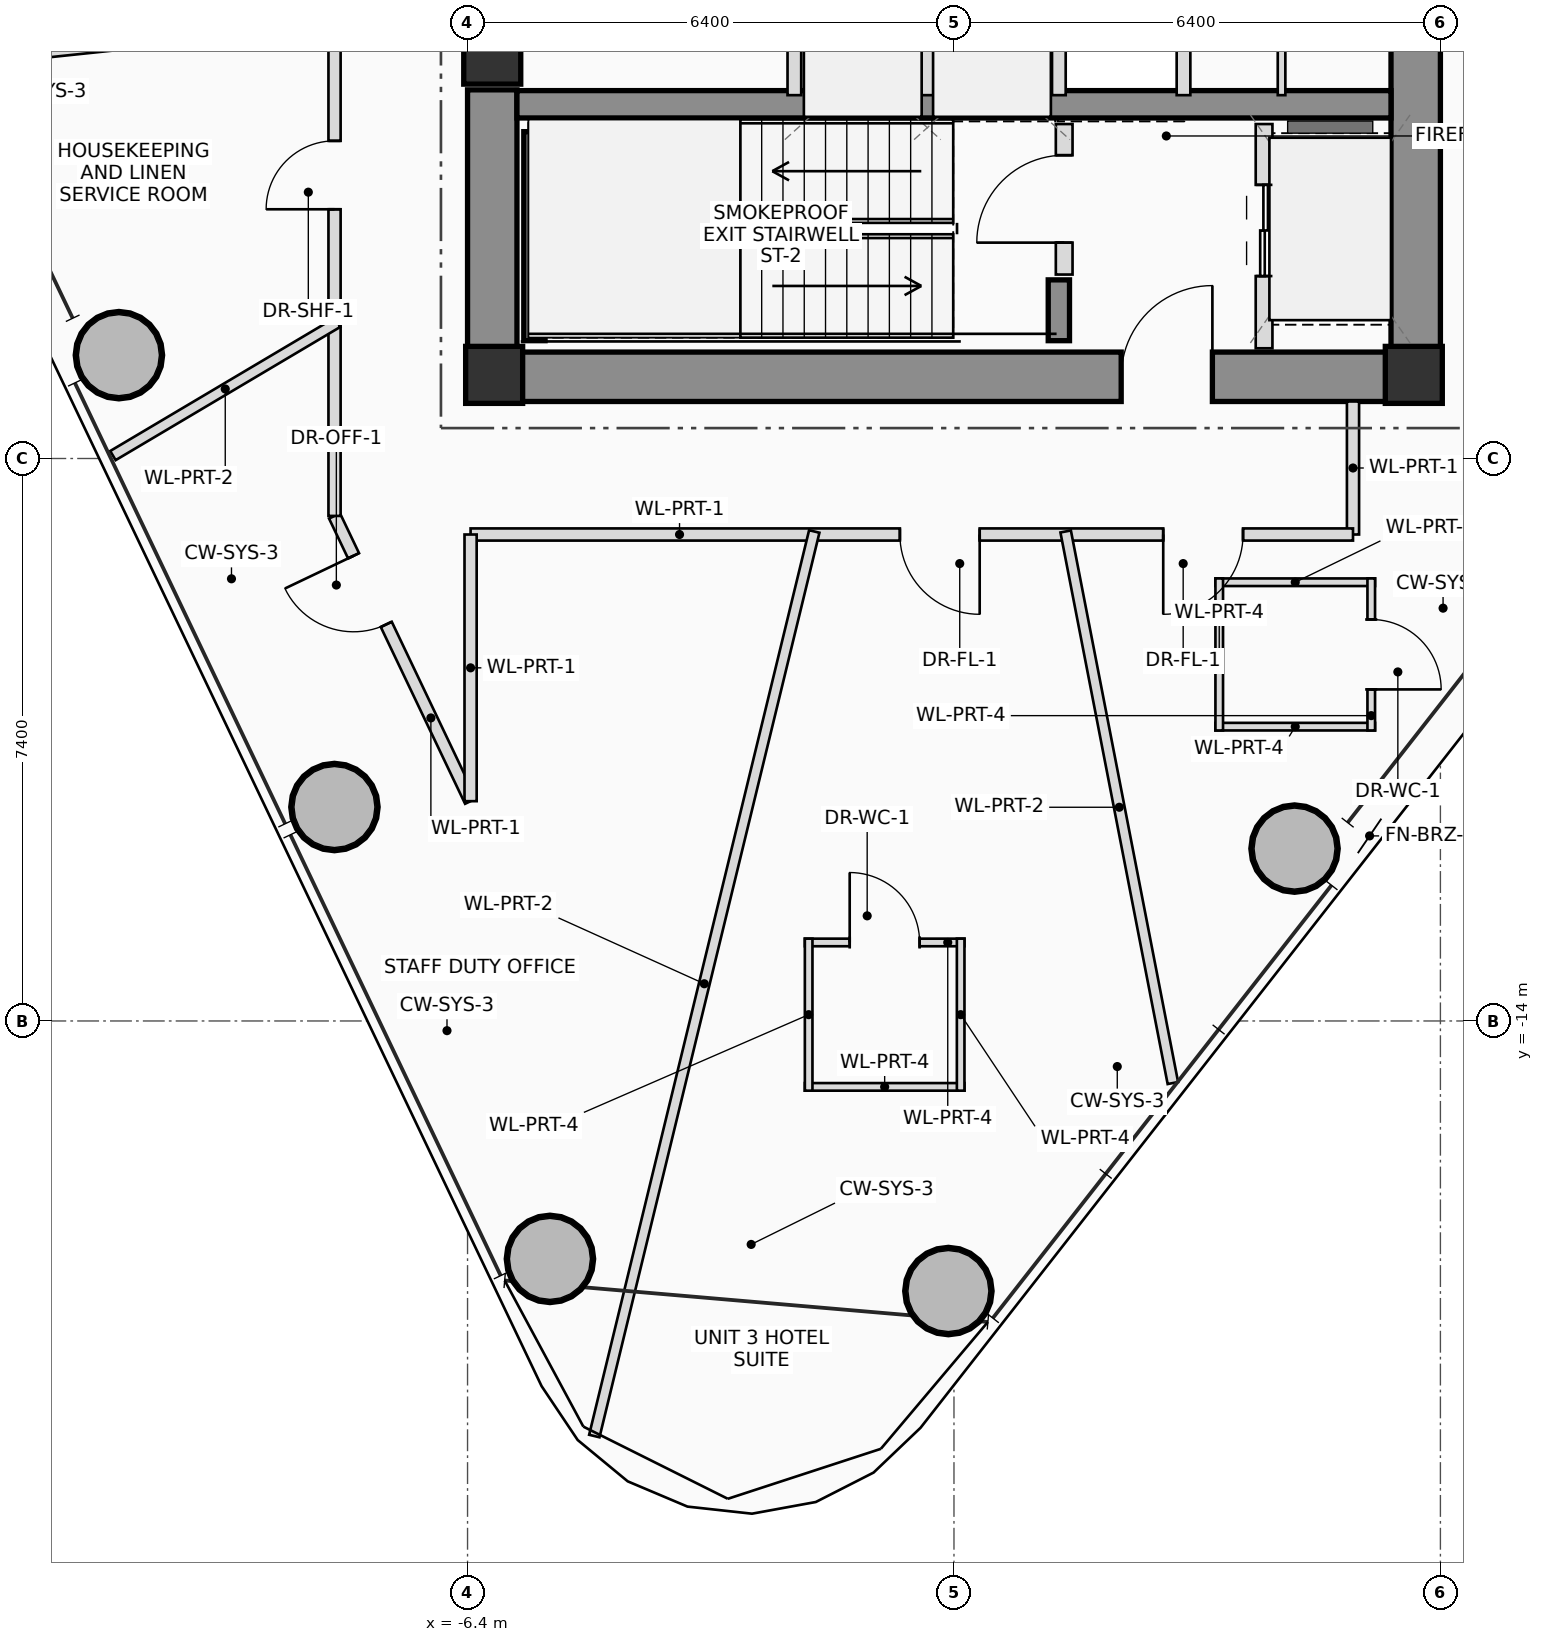
"""IFC4 building model, lengths in metres.
Left out: names, types, materials, properties, quantities, classifications, styles, units other than length and angle.
Written with IfcOpenShell. Run it as: python <this file> out.ifc"""

import sys

from ifc_helpers import new_model, si_unit, direction, frame, frame_2d, origin, origin_2d, place, context, subcontext, project, spatial, rectangle, hollow_circle, extrude, source, transform, mapped, element, fill, save


model = new_model("IFC4")
c1 = context("Model", 3, precision=1e-05, world=origin(), true_north=direction((0.0, 1.0)))
c2 = subcontext(c1, "Body", "Model", "MODEL_VIEW")
j1 = project(units=[si_unit("LENGTHUNIT", "METRE"), si_unit("PLANEANGLEUNIT", "RADIAN")], contexts=[c1])
p1 = place(None, origin())
s1 = spatial("IfcSite", under=j1, at=p1, CompositionType="ELEMENT")
p2 = place(p1, origin())
s2 = spatial("IfcBuilding", under=s1, at=p2, CompositionType="ELEMENT")
p3 = place(p2, frame((0.0, 0.0, 212.15)))
s3 = spatial("IfcBuildingStorey", under=s2, at=p3, CompositionType="ELEMENT", Elevation=212.15)
m1 = source(origin(), c2, "Body", "SweptSolid", [
    extrude(rectangle(XDim=0.75, YDim=0.75, at=origin_2d()), origin(), (0.0, 0.0, 1.0), 3.45),
])
for number, where, z_axis, x_axis in (
    (1, (-6.05, -5.5, 0.0), (0.0, 0.0, 1.0), (1.0, 0.0, 0.0)),
    (2, (6.05, -5.5, 0.0), (0.0, 0.0, 1.0), (1.0, 0.0, 0.0)),
):
    element("IfcColumn", number, at=place(p3, frame(where, z_axis=z_axis, x_axis=x_axis)), inside=s3, PredefinedType="COLUMN", context=c2, shape_type="MappedRepresentation", body=[
        mapped(m1, transform((0.0, 0.0, 0.0), scale=1.0)),
    ])
p4 = place(p3, frame((-6.4, -5.525, 0.0), z_axis=(0.0, 0.0, 1.0), x_axis=(1.0, 0.0, 0.0)))
e3 = element("IfcWall", 3, at=p4, inside=s3, PredefinedType="SHEAR", context=c2, shape_type="SweptSolid", body=[
    extrude(rectangle(XDim=12.8, YDim=0.65, at=frame_2d((6.4, 0.0))), origin(), (0.0, 0.0, 1.0), 3.45),
])
p5 = place(p4, frame((8.6, 0.0, 0.0)))
e4 = element("IfcOpeningElement", 4, at=p5, cuts=e3, PredefinedType="OPENING", context=c2, shape_type="SweptSolid", body=[
    extrude(rectangle(XDim=1.2, YDim=2.2, at=frame_2d((0.6, 1.1))), frame((0.0, 0.335, 0.0), z_axis=(0.0, -1.0, 0.0), x_axis=(1.0, 0.0, 0.0)), (0.0, 0.0, 1.0), 0.67),
])
p6 = place(p3, frame((6.075, -5.2, 0.0), z_axis=(0.0, 0.0, 1.0), x_axis=(0.0, 1.0, 0.0)))
e5 = element("IfcWall", 5, at=p6, inside=s3, PredefinedType="SHEAR", context=c2, shape_type="SweptSolid", body=[
    extrude(rectangle(XDim=10.4, YDim=0.65, at=frame_2d((5.2, 0.0))), origin(), (0.0, 0.0, 1.0), 3.45),
])
p7 = place(p3, frame((-6.075, -5.2, 0.0), z_axis=(0.0, 0.0, 1.0), x_axis=(0.0, 1.0, 0.0)))
e6 = element("IfcWall", 6, at=p7, inside=s3, PredefinedType="SHEAR", context=c2, shape_type="SweptSolid", body=[
    extrude(rectangle(XDim=3.45, YDim=0.65, at=frame_2d((1.725, 0.0))), origin(), (0.0, 0.0, 1.0), 3.45),
])
p8 = place(p3, frame((-5.75, -1.94, 0.0), z_axis=(0.0, 0.0, 1.0), x_axis=(1.0, 0.0, 0.0)))
e7 = element("IfcWall", 7, at=p8, inside=s3, PredefinedType="SHEAR", context=c2, shape_type="SweptSolid", body=[
    extrude(rectangle(XDim=11.5, YDim=0.36, at=frame_2d((5.75, 0.0))), origin(), (0.0, 0.0, 1.0), 3.45),
])
p9 = place(p3, frame((-5.52, -5.05, 0.0), z_axis=(0.0, 0.0, 1.0), x_axis=(0.0, 1.0, 0.0)))
e8 = element("IfcWall", 8, at=p9, inside=s3, PredefinedType="SHEAR", context=c2, shape_type="SweptSolid", body=[
    extrude(rectangle(XDim=2.75, YDim=0.28, at=frame_2d((1.375, 0.0))), origin(), (0.0, 0.0, 1.0), 3.45),
])
p10 = place(p3, frame((1.38, -5.05, 0.0), z_axis=(0.0, 0.0, 1.0), x_axis=(0.0, 1.0, 0.0)))
e9 = element("IfcWall", 9, at=p10, inside=s3, PredefinedType="SHEAR", context=c2, shape_type="SweptSolid", body=[
    extrude(rectangle(XDim=0.8, YDim=0.28, at=frame_2d((0.4, 0.0))), origin(), (0.0, 0.0, 1.0), 3.45),
])
p11 = place(p3, frame((-6.075, -1.3, 0.0), z_axis=(0.0, 0.0, 1.0), x_axis=(1.0, 0.0, 0.0)))
e10 = element("IfcColumn", 10, at=p11, inside=s3, PredefinedType="COLUMN", context=c2, shape_type="MappedRepresentation", body=[
    mapped(m1, transform((0.0, 0.0, 0.0), scale=1.0)),
])
m2 = source(origin(), c2, "Body", "SweptSolid", [
    extrude(hollow_circle(Radius=0.575, WallThickness=0.042, at=origin_2d()), origin(), (0.0, 0.0, 1.0), 3.45),
])
for number, where, z_axis, x_axis in (
    (11, (-0.073, -17.553, 0.0), (0.0, 0.0, 1.0), (1.0, 0.0, 0.0)),
    (12, (4.481, -11.732, 0.0), (0.0, 0.0, 1.0), (1.0, 0.0, 0.0)),
    (13, (-10.987, -5.24, 0.0), (0.0, 0.0, 1.0), (1.0, 0.0, 0.0)),
    (14, (-8.151, -11.185, 0.0), (0.0, 0.0, 1.0), (1.0, 0.0, 0.0)),
    (15, (-5.316, -17.13, 0.0), (0.0, 0.0, 1.0), (1.0, 0.0, 0.0)),
):
    element("IfcColumn", number, at=place(p3, frame(where, z_axis=z_axis, x_axis=x_axis)), inside=s3, PredefinedType="COLUMN", context=c2, shape_type="MappedRepresentation", body=[
        mapped(m2, transform((0.0, 0.0, 0.0), scale=1.0)),
    ])
p12 = place(p3, frame((1.45, -4.18, 0.0), z_axis=(0.0, 0.0, 1.0), x_axis=(0.0, 1.0, 0.0)))
e16 = element("IfcWall", 16, at=p12, inside=s3, PredefinedType="PLUMBINGWALL", context=c2, shape_type="SweptSolid", body=[
    extrude(rectangle(XDim=1.98, YDim=0.22, at=frame_2d((0.99, 0.0))), origin(), (0.0, 0.0, 1.0), 3.25),
])
p13 = place(p12, frame((0.42, 0.0, 0.0)))
e17 = element("IfcOpeningElement", 17, at=p13, cuts=e16, PredefinedType="OPENING", context=c2, shape_type="SweptSolid", body=[
    extrude(rectangle(XDim=1.15, YDim=2.15, at=frame_2d((0.575, 1.075))), frame((0.0, 0.12, 0.0), z_axis=(0.0, -1.0, 0.0), x_axis=(1.0, 0.0, 0.0)), (0.0, 0.0, 1.0), 0.24),
])
p14 = place(p3, frame((4.08, -5.15, 0.0), z_axis=(0.0, 0.0, 1.0), x_axis=(0.0, 1.0, 0.0)))
e18 = element("IfcWall", 18, at=p14, inside=s3, PredefinedType="PLUMBINGWALL", context=c2, shape_type="SweptSolid", body=[
    extrude(rectangle(XDim=2.95, YDim=0.22, at=frame_2d((1.475, 0.0))), origin(), (0.0, 0.0, 1.0), 3.25),
])
p15 = place(p14, frame((0.95, 0.0, 0.0)))
e19 = element("IfcOpeningElement", 19, at=p15, cuts=e18, PredefinedType="OPENING", context=c2, shape_type="SweptSolid", body=[
    extrude(rectangle(XDim=1.2, YDim=2.25, at=frame_2d((0.6, 1.125))), frame((0.0, 0.12, 0.0), z_axis=(0.0, -1.0, 0.0), x_axis=(1.0, 0.0, 0.0)), (0.0, 0.0, 1.0), 0.24),
])
for number, where, z_axis, x_axis in (
    (20, (-2.1, -1.82, 0.0), (0.0, 0.0, 1.0), (0.0, 1.0, 0.0)),
    (21, (-0.35, -1.82, 0.0), (0.0, 0.0, 1.0), (0.0, 1.0, 0.0)),
    (22, (1.38, -1.82, 0.0), (0.0, 0.0, 1.0), (0.0, 1.0, 0.0)),
    (23, (3.02, -1.82, 0.0), (0.0, 0.0, 1.0), (0.0, 1.0, 0.0)),
):
    element("IfcWall", number, at=place(p3, frame(where, z_axis=z_axis, x_axis=x_axis)), inside=s3, PredefinedType="PLUMBINGWALL", context=c2, shape_type="SweptSolid", body=[
        extrude(rectangle(XDim=0.98, YDim=0.18, at=frame_2d((0.49, 0.0))), origin(), (0.0, 0.0, 1.0), 3.25),
    ])
p16 = place(p3, frame((4.31, -1.82, 0.0), z_axis=(0.0, 0.0, 1.0), x_axis=(0.0, 1.0, 0.0)))
e24 = element("IfcWall", 24, at=p16, inside=s3, PredefinedType="PARTITIONING", context=c2, shape_type="SweptSolid", body=[
    extrude(rectangle(XDim=0.98, YDim=0.1, at=frame_2d((0.49, 0.0))), origin(), (0.0, 0.0, 1.0), 3.25),
])
p17 = place(p3, frame((-1.962, -12.967, 0.0), z_axis=(0.0, 0.0, 1.0), x_axis=(1.0, 0.0, 0.0)))
e25 = element("IfcWall", 25, at=p17, inside=s3, PredefinedType="PARTITIONING", context=c2, shape_type="SweptSolid", body=[
    extrude(rectangle(XDim=2.1, YDim=0.1, at=frame_2d((1.05, 0.0))), origin(), (0.0, 0.0, 1.0), 3.25),
])
p18 = place(p17, frame((0.59, 0.0, 0.0)))
e26 = element("IfcOpeningElement", 26, at=p18, cuts=e25, PredefinedType="OPENING", context=c2, shape_type="SweptSolid", body=[
    extrude(rectangle(XDim=0.92, YDim=2.1, at=frame_2d((0.46, 1.05))), frame((0.0, 0.06, 0.0), z_axis=(0.0, -1.0, 0.0), x_axis=(1.0, 0.0, 0.0)), (0.0, 0.0, 1.0), 0.12),
])
p19 = place(p3, frame((0.138, -14.867, 0.0), z_axis=(0.0, 0.0, 1.0), x_axis=(-1.0, 0.0, 0.0)))
e27 = element("IfcWall", 27, at=p19, inside=s3, PredefinedType="PARTITIONING", context=c2, shape_type="SweptSolid", body=[
    extrude(rectangle(XDim=2.1, YDim=0.1, at=frame_2d((1.05, 0.0))), origin(), (0.0, 0.0, 1.0), 2.605),
])
p20 = place(p3, frame((0.088, -12.917, 0.0), z_axis=(0.0, 0.0, 1.0), x_axis=(0.0, -1.0, 0.0)))
e28 = element("IfcWall", 28, at=p20, inside=s3, PredefinedType="PARTITIONING", context=c2, shape_type="SweptSolid", body=[
    extrude(rectangle(XDim=2.0, YDim=0.1, at=frame_2d((1.0, 0.0))), origin(), (0.0, 0.0, 1.0), 2.905),
])
p21 = place(p3, frame((-1.912, -14.917, 0.0), z_axis=(0.0, 0.0, 1.0), x_axis=(0.0, 1.0, 0.0)))
e29 = element("IfcWall", 29, at=p21, inside=s3, PredefinedType="PARTITIONING", context=c2, shape_type="SweptSolid", body=[
    extrude(rectangle(XDim=2.0, YDim=0.1, at=frame_2d((1.0, 0.0))), origin(), (0.0, 0.0, 1.0), 2.605),
])
for number, where, z_axis, x_axis in (
    (30, (3.44, -8.228, 0.0), (0.0, 0.0, 1.0), (1.0, 0.0, 0.0)),
    (31, (5.54, -10.128, 0.0), (0.0, 0.0, 1.0), (-1.0, 0.0, 0.0)),
):
    element("IfcWall", number, at=place(p3, frame(where, z_axis=z_axis, x_axis=x_axis)), inside=s3, PredefinedType="PARTITIONING", context=c2, shape_type="SweptSolid", body=[
        extrude(rectangle(XDim=2.1, YDim=0.1, at=frame_2d((1.05, 0.0))), origin(), (0.0, 0.0, 1.0), 2.605),
    ])
p22 = place(p3, frame((5.49, -8.178, 0.0), z_axis=(0.0, 0.0, 1.0), x_axis=(0.0, -1.0, 0.0)))
e32 = element("IfcWall", 32, at=p22, inside=s3, PredefinedType="PARTITIONING", context=c2, shape_type="SweptSolid", body=[
    extrude(rectangle(XDim=2.0, YDim=0.1, at=frame_2d((1.0, 0.0))), origin(), (0.0, 0.0, 1.0), 2.605),
])
p23 = place(p22, frame((0.54, 0.0, 0.0)))
e33 = element("IfcOpeningElement", 33, at=p23, cuts=e32, PredefinedType="OPENING", context=c2, shape_type="SweptSolid", body=[
    extrude(rectangle(XDim=0.92, YDim=2.1, at=frame_2d((0.46, 1.05))), frame((0.0, 0.06, 0.0), z_axis=(0.0, -1.0, 0.0), x_axis=(1.0, 0.0, 0.0)), (0.0, 0.0, 1.0), 0.12),
])
p24 = place(p3, frame((3.49, -10.178, 0.0), z_axis=(0.0, 0.0, 1.0), x_axis=(0.0, 1.0, 0.0)))
e34 = element("IfcWall", 34, at=p24, inside=s3, PredefinedType="PARTITIONING", context=c2, shape_type="SweptSolid", body=[
    extrude(rectangle(XDim=2.0, YDim=0.1, at=frame_2d((1.0, 0.0))), origin(), (0.0, 0.0, 1.0), 2.805),
])
p25 = place(p3, frame((-6.36, -11.108, 0.0), z_axis=(0.0, 0.0, 1.0), x_axis=(-0.430460013629, 0.902609648002, 0.0)))
e35 = element("IfcWall", 35, at=p25, inside=s3, PredefinedType="PARTITIONING", context=c2, shape_type="SweptSolid", body=[
    extrude(rectangle(XDim=4.158, YDim=0.16, at=frame_2d((2.079, 0.0))), origin(), (0.0, 0.0, 1.0), 2.605),
])
p26 = place(p25, frame((2.577, 0.0, 0.0)))
e36 = element("IfcOpeningElement", 36, at=p26, cuts=e35, PredefinedType="OPENING", context=c2, shape_type="SweptSolid", body=[
    extrude(rectangle(XDim=1.0, YDim=2.25, at=frame_2d((0.5, 1.125))), frame((0.0, 0.09, 0.0), z_axis=(0.0, -1.0, 0.0), x_axis=(1.0, 0.0, 0.0)), (0.0, 0.0, 1.0), 0.18),
])
p27 = place(p3, frame((-8.15, -7.355, 0.0), z_axis=(0.0, 0.0, 1.0), x_axis=(0.0, 1.0, 0.0)))
e37 = element("IfcWall", 37, at=p27, inside=s3, PredefinedType="PARTITIONING", context=c2, shape_type="SweptSolid", body=[
    extrude(rectangle(XDim=14.956, YDim=0.16, at=frame_2d((7.478, 0.0))), origin(), (0.0, 0.0, 1.0), 2.605),
])
p28 = place(p27, frame((4.034, 0.0, 0.0)))
e38 = element("IfcOpeningElement", 38, at=p28, cuts=e37, PredefinedType="OPENING", context=c2, shape_type="SweptSolid", body=[
    extrude(rectangle(XDim=0.9, YDim=2.05, at=frame_2d((0.45, 1.025))), frame((0.0, 0.09, 0.0), z_axis=(0.0, -1.0, 0.0), x_axis=(1.0, 0.0, 0.0)), (0.0, 0.0, 1.0), 0.18),
])
p29 = place(p27, frame((10.129, 0.0, 0.0)))
e39 = element("IfcOpeningElement", 39, at=p29, cuts=e37, PredefinedType="OPENING", context=c2, shape_type="SweptSolid", body=[
    extrude(rectangle(XDim=1.0, YDim=2.25, at=frame_2d((0.5, 1.125))), frame((0.0, 0.09, 0.0), z_axis=(0.0, -1.0, 0.0), x_axis=(1.0, 0.0, 0.0)), (0.0, 0.0, 1.0), 0.18),
])
p30 = place(p3, frame((5.25, -5.85, 0.0), z_axis=(0.0, 0.0, 1.0), x_axis=(0.0, -1.0, 0.0)))
e40 = element("IfcWall", 40, at=p30, inside=s3, PredefinedType="PARTITIONING", context=c2, shape_type="SweptSolid", body=[
    extrude(rectangle(XDim=1.75, YDim=0.16, at=frame_2d((0.875, 0.0))), origin(), (0.0, 0.0, 1.0), 3.25),
])
p31 = place(p3, frame((5.25, -7.6, 0.0), z_axis=(0.0, 0.0, 1.0), x_axis=(-1.0, 0.0, 0.0)))
e41 = element("IfcWall", 41, at=p31, inside=s3, PredefinedType="PARTITIONING", context=c2, shape_type="SweptSolid", body=[
    extrude(rectangle(XDim=11.61, YDim=0.16, at=frame_2d((5.805, 0.0))), origin(), (0.0, 0.0, 1.0), 2.605),
])
p32 = place(p31, frame((1.447, 0.0, 0.0)))
e42 = element("IfcOpeningElement", 42, at=p32, cuts=e41, PredefinedType="OPENING", context=c2, shape_type="SweptSolid", body=[
    extrude(rectangle(XDim=1.05, YDim=2.2, at=frame_2d((0.525, 1.1))), frame((0.0, 0.09, 0.0), z_axis=(0.0, -1.0, 0.0), x_axis=(1.0, 0.0, 0.0)), (0.0, 0.0, 1.0), 0.18),
])
p33 = place(p31, frame((4.912, 0.0, 0.0)))
e43 = element("IfcOpeningElement", 43, at=p33, cuts=e41, PredefinedType="OPENING", context=c2, shape_type="SweptSolid", body=[
    extrude(rectangle(XDim=1.05, YDim=2.2, at=frame_2d((0.525, 1.1))), frame((0.0, 0.09, 0.0), z_axis=(0.0, -1.0, 0.0), x_axis=(1.0, 0.0, 0.0)), (0.0, 0.0, 1.0), 0.18),
])
p34 = place(p3, frame((-6.36, -7.6, 0.0), z_axis=(0.0, 0.0, 1.0), x_axis=(0.0, -1.0, 0.0)))
e44 = element("IfcWall", 44, at=p34, inside=s3, PredefinedType="PARTITIONING", context=c2, shape_type="SweptSolid", body=[
    extrude(rectangle(XDim=3.508, YDim=0.16, at=frame_2d((1.754, 0.0))), origin(), (0.0, 0.0, 1.0), 3.25),
])
p35 = place(p3, frame((-8.11, -0.852, 0.0), z_axis=(0.0, 0.0, 1.0), x_axis=(-0.994517501458, -0.104570260086, 0.0)))
e45 = element("IfcWall", 45, at=p35, inside=s3, PredefinedType="PARTITIONING", context=c2, shape_type="SweptSolid", body=[
    extrude(rectangle(XDim=5.438, YDim=0.14, at=frame_2d((2.719, 0.0))), origin(), (0.0, 0.0, 1.0), 2.765),
])
p36 = place(p3, frame((-8.11, -4.809, 0.0), z_axis=(0.0, 0.0, 1.0), x_axis=(-0.860151862046, -0.510038012524, 0.0)))
e46 = element("IfcWall", 46, at=p36, inside=s3, PredefinedType="PARTITIONING", context=c2, shape_type="SweptSolid", body=[
    extrude(rectangle(XDim=3.436, YDim=0.14, at=frame_2d((1.718, 0.0))), origin(), (0.0, 0.0, 1.0), 2.605),
])
p37 = place(p3, frame((-1.838, -7.56, 0.0), z_axis=(0.0, 0.0, 1.0), x_axis=(-0.236259509823, -0.971689993783, 0.0)))
e47 = element("IfcWall", 47, at=p37, inside=s3, PredefinedType="PARTITIONING", context=c2, shape_type="SweptSolid", body=[
    extrude(rectangle(XDim=12.247, YDim=0.14, at=frame_2d((6.124, 0.0))), origin(), (0.0, 0.0, 1.0), 2.605),
])
p38 = place(p3, frame((1.469, -7.56, 0.0), z_axis=(0.0, 0.0, 1.0), x_axis=(0.190822808967, -0.981624498257, 0.0)))
e48 = element("IfcWall", 48, at=p38, inside=s3, PredefinedType="PARTITIONING", context=c2, shape_type="SweptSolid", body=[
    extrude(rectangle(XDim=7.392, YDim=0.14, at=frame_2d((3.696, 0.0))), origin(), (0.0, 0.0, 1.0), 2.765),
])
p39 = place(p5, origin())
e49 = element("IfcDoor", 49, at=p39, inside=s3, OperationType="SINGLE_SWING_RIGHT", PredefinedType="DOOR", context=c2, shape_type="SweptSolid", body=[
    extrude(rectangle(XDim=1.2, YDim=2.2, at=frame_2d((0.6, 1.1))), frame((0.0, 0.025, 0.0), z_axis=(0.0, -1.0, 0.0), x_axis=(1.0, 0.0, 0.0)), (0.0, 0.0, 1.0), 0.05),
])
fill(e4, e49)
p40 = place(p13, origin())
e50 = element("IfcDoor", 50, at=p40, inside=s3, OperationType="SINGLE_SWING_LEFT", PredefinedType="DOOR", context=c2, shape_type="SweptSolid", body=[
    extrude(rectangle(XDim=1.15, YDim=2.15, at=frame_2d((0.575, 1.075))), frame((0.0, 0.025, 0.0), z_axis=(0.0, -1.0, 0.0), x_axis=(1.0, 0.0, 0.0)), (0.0, 0.0, 1.0), 0.05),
])
fill(e17, e50)
p41 = place(p15, origin())
e51 = element("IfcDoor", 51, at=p41, inside=s3, OperationType="DOUBLE_DOOR_SLIDING", PredefinedType="DOOR", context=c2, shape_type="SweptSolid", body=[
    extrude(rectangle(XDim=1.2, YDim=2.25, at=frame_2d((0.6, 1.125))), frame((0.0, 0.025, 0.0), z_axis=(0.0, -1.0, 0.0), x_axis=(1.0, 0.0, 0.0)), (0.0, 0.0, 1.0), 0.05),
])
fill(e19, e51)
p42 = place(p18, origin())
e52 = element("IfcDoor", 52, at=p42, inside=s3, OperationType="SINGLE_SWING_LEFT", PredefinedType="DOOR", context=c2, shape_type="SweptSolid", body=[
    extrude(rectangle(XDim=0.92, YDim=2.1, at=frame_2d((0.46, 1.05))), frame((0.0, 0.025, 0.0), z_axis=(0.0, -1.0, 0.0), x_axis=(1.0, 0.0, 0.0)), (0.0, 0.0, 1.0), 0.05),
])
fill(e26, e52)
p43 = place(p23, origin())
e53 = element("IfcDoor", 53, at=p43, inside=s3, OperationType="SINGLE_SWING_RIGHT", PredefinedType="DOOR", context=c2, shape_type="SweptSolid", body=[
    extrude(rectangle(XDim=0.92, YDim=2.1, at=frame_2d((0.46, 1.05))), frame((0.0, 0.025, 0.0), z_axis=(0.0, -1.0, 0.0), x_axis=(1.0, 0.0, 0.0)), (0.0, 0.0, 1.0), 0.05),
])
fill(e33, e53)
p44 = place(p26, origin())
e54 = element("IfcDoor", 54, at=p44, inside=s3, OperationType="SINGLE_SWING_RIGHT", PredefinedType="DOOR", context=c2, shape_type="SweptSolid", body=[
    extrude(rectangle(XDim=1.0, YDim=2.25, at=frame_2d((0.5, 1.125))), frame((0.0, 0.025, 0.0), z_axis=(0.0, -1.0, 0.0), x_axis=(1.0, 0.0, 0.0)), (0.0, 0.0, 1.0), 0.05),
])
fill(e36, e54)
p45 = place(p28, origin())
e55 = element("IfcDoor", 55, at=p45, inside=s3, OperationType="SINGLE_SWING_LEFT", PredefinedType="DOOR", context=c2, shape_type="SweptSolid", body=[
    extrude(rectangle(XDim=0.9, YDim=2.05, at=frame_2d((0.45, 1.025))), frame((0.0, 0.025, 0.0), z_axis=(0.0, -1.0, 0.0), x_axis=(1.0, 0.0, 0.0)), (0.0, 0.0, 1.0), 0.05),
])
fill(e38, e55)
p46 = place(p32, origin())
e56 = element("IfcDoor", 56, at=p46, inside=s3, OperationType="SINGLE_SWING_RIGHT", PredefinedType="DOOR", context=c2, shape_type="SweptSolid", body=[
    extrude(rectangle(XDim=1.05, YDim=2.2, at=frame_2d((0.525, 1.1))), frame((0.0, 0.025, 0.0), z_axis=(0.0, -1.0, 0.0), x_axis=(1.0, 0.0, 0.0)), (0.0, 0.0, 1.0), 0.05),
])
fill(e42, e56)
p47 = place(p33, origin())
e57 = element("IfcDoor", 57, at=p47, inside=s3, OperationType="SINGLE_SWING_LEFT", PredefinedType="DOOR", context=c2, shape_type="SweptSolid", body=[
    extrude(rectangle(XDim=1.05, YDim=2.2, at=frame_2d((0.525, 1.1))), frame((0.0, 0.025, 0.0), z_axis=(0.0, -1.0, 0.0), x_axis=(1.0, 0.0, 0.0)), (0.0, 0.0, 1.0), 0.05),
])
fill(e43, e57)
save(model, sys.argv[1])
